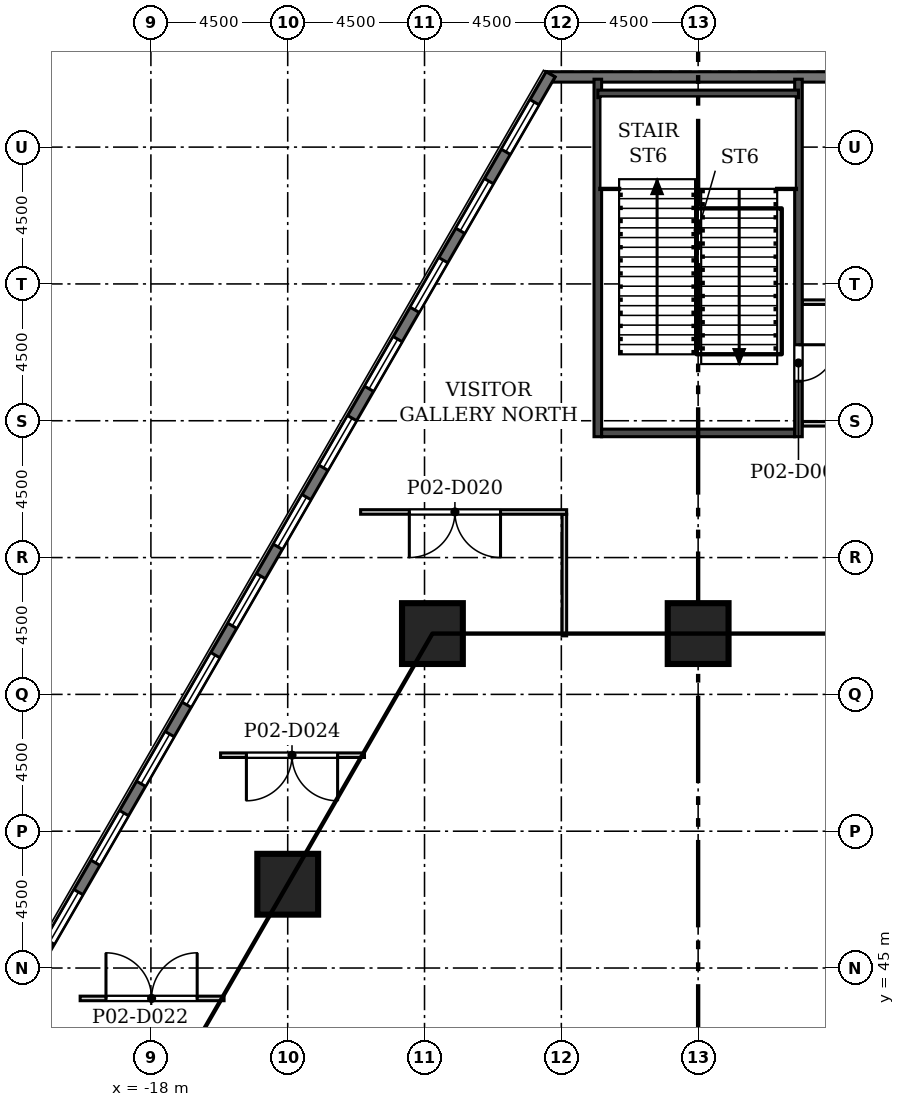
"""IFC4 building model, lengths in metres.
Left out: names, types, materials, properties, quantities, classifications, styles, units other than length and angle.
Written with IfcOpenShell. Run it as: python <this file> out.ifc"""

import sys

from ifc_helpers import new_model, si_unit, direction, frame, frame_2d, origin, origin_2d, place, context, subcontext, project, spatial, polyline, rectangle, outline, extrude, element, fill, save


model = new_model("IFC4")
c1 = context("Model", 3, precision=1e-05, world=origin(), true_north=direction((0.0, 1.0)))
c2 = subcontext(c1, "Body", "Model", "MODEL_VIEW")
j1 = project(units=[si_unit("LENGTHUNIT", "METRE"), si_unit("PLANEANGLEUNIT", "RADIAN")], contexts=[c1])
p1 = place(None, origin())
s1 = spatial("IfcSite", under=j1, at=p1, CompositionType="ELEMENT")
p2 = place(p1, origin())
s2 = spatial("IfcBuilding", under=s1, at=p2, CompositionType="ELEMENT")
p3 = place(p2, frame((0.0, 0.0, 14.0)))
s3 = spatial("IfcBuildingStorey", under=s2, at=p3, CompositionType="ELEMENT", Elevation=14.0)
for number, where, z_axis, x_axis in (
    (1, (-8.74, 56.0, 0.0), (0.0, 0.0, 1.0), (1.0, 0.0, 0.0)),
    (2, (-13.5, 47.756, 0.0), (0.0, 0.0, 1.0), (1.0, 0.0, 0.0)),
    (3, (0.0, 56.0, 0.0), (0.0, 0.0, 1.0), (1.0, 0.0, 0.0)),
):
    element("IfcColumn", number, at=place(p3, frame(where, z_axis=z_axis, x_axis=x_axis)), inside=s3, PredefinedType="COLUMN", context=c2, shape_type="SweptSolid", body=[
        extrude(rectangle(XDim=2.0, YDim=2.0, at=origin_2d()), origin(), (0.0, 0.0, 1.0), 6.0),
    ])
p4 = place(p3, origin())
e4 = element("IfcWall", 4, at=p4, inside=s3, PredefinedType="SOLIDWALL", context=c2, shape_type="SweptSolid", body=[
    extrude(outline(polyline([(5.001, 74.478), (4.706, 74.308), (4.805, 74.138), (-4.805, 74.138), (-4.706, 74.308), (-5.001, 74.478), (-5.001, 74.479), (5.001, 74.479), (5.001, 74.478)])), origin(), (0.0, 0.0, 1.0), 5.7),
])
p5 = place(p3, frame((-4.853, 74.393, 0.0), z_axis=(0.0, 0.0, 1.0), x_axis=(-0.49999894854, -0.866026010844, 0.0)))
e5 = element("IfcWall", 5, at=p5, inside=s3, PredefinedType="SOLIDWALL", context=c2, shape_type="SweptSolid", body=[
    extrude(rectangle(XDim=76.0, YDim=0.34, at=frame_2d((38.0, 0.0))), origin(), (0.0, 0.0, 1.0), 5.7),
])
p6 = place(p5, frame((1.058, 0.0, 0.9)))
e6 = element("IfcOpeningElement", 6, at=p6, cuts=e5, PredefinedType="OPENING", context=c2, shape_type="SweptSolid", body=[
    extrude(rectangle(XDim=1.885, YDim=3.5, at=frame_2d((0.942, 1.75))), frame((0.0, 0.18, 0.0), z_axis=(0.0, -1.0, 0.0), x_axis=(1.0, 0.0, 0.0)), (0.0, 0.0, 1.0), 0.36),
])
p7 = place(p5, frame((4.058, 0.0, 0.9)))
e7 = element("IfcOpeningElement", 7, at=p7, cuts=e5, PredefinedType="OPENING", context=c2, shape_type="SweptSolid", body=[
    extrude(rectangle(XDim=1.885, YDim=3.5, at=frame_2d((0.942, 1.75))), frame((0.0, 0.18, 0.0), z_axis=(0.0, -1.0, 0.0), x_axis=(1.0, 0.0, 0.0)), (0.0, 0.0, 1.0), 0.36),
])
p8 = place(p5, frame((7.058, 0.0, 0.9)))
e8 = element("IfcOpeningElement", 8, at=p8, cuts=e5, PredefinedType="OPENING", context=c2, shape_type="SweptSolid", body=[
    extrude(rectangle(XDim=1.885, YDim=3.5, at=frame_2d((0.942, 1.75))), frame((0.0, 0.18, 0.0), z_axis=(0.0, -1.0, 0.0), x_axis=(1.0, 0.0, 0.0)), (0.0, 0.0, 1.0), 0.36),
])
p9 = place(p5, frame((10.058, 0.0, 0.9)))
e9 = element("IfcOpeningElement", 9, at=p9, cuts=e5, PredefinedType="OPENING", context=c2, shape_type="SweptSolid", body=[
    extrude(rectangle(XDim=1.885, YDim=3.5, at=frame_2d((0.942, 1.75))), frame((0.0, 0.18, 0.0), z_axis=(0.0, -1.0, 0.0), x_axis=(1.0, 0.0, 0.0)), (0.0, 0.0, 1.0), 0.36),
])
p10 = place(p5, frame((13.058, 0.0, 0.9)))
e10 = element("IfcOpeningElement", 10, at=p10, cuts=e5, PredefinedType="OPENING", context=c2, shape_type="SweptSolid", body=[
    extrude(rectangle(XDim=1.885, YDim=3.5, at=frame_2d((0.942, 1.75))), frame((0.0, 0.18, 0.0), z_axis=(0.0, -1.0, 0.0), x_axis=(1.0, 0.0, 0.0)), (0.0, 0.0, 1.0), 0.36),
])
p11 = place(p5, frame((16.058, 0.0, 0.9)))
e11 = element("IfcOpeningElement", 11, at=p11, cuts=e5, PredefinedType="OPENING", context=c2, shape_type="SweptSolid", body=[
    extrude(rectangle(XDim=1.885, YDim=3.5, at=frame_2d((0.942, 1.75))), frame((0.0, 0.18, 0.0), z_axis=(0.0, -1.0, 0.0), x_axis=(1.0, 0.0, 0.0)), (0.0, 0.0, 1.0), 0.36),
])
p12 = place(p5, frame((19.058, 0.0, 0.9)))
e12 = element("IfcOpeningElement", 12, at=p12, cuts=e5, PredefinedType="OPENING", context=c2, shape_type="SweptSolid", body=[
    extrude(rectangle(XDim=1.885, YDim=3.5, at=frame_2d((0.942, 1.75))), frame((0.0, 0.18, 0.0), z_axis=(0.0, -1.0, 0.0), x_axis=(1.0, 0.0, 0.0)), (0.0, 0.0, 1.0), 0.36),
])
p13 = place(p5, frame((22.058, 0.0, 0.9)))
e13 = element("IfcOpeningElement", 13, at=p13, cuts=e5, PredefinedType="OPENING", context=c2, shape_type="SweptSolid", body=[
    extrude(rectangle(XDim=1.885, YDim=3.5, at=frame_2d((0.942, 1.75))), frame((0.0, 0.18, 0.0), z_axis=(0.0, -1.0, 0.0), x_axis=(1.0, 0.0, 0.0)), (0.0, 0.0, 1.0), 0.36),
])
p14 = place(p5, frame((25.058, 0.0, 0.9)))
e14 = element("IfcOpeningElement", 14, at=p14, cuts=e5, PredefinedType="OPENING", context=c2, shape_type="SweptSolid", body=[
    extrude(rectangle(XDim=1.885, YDim=3.5, at=frame_2d((0.942, 1.75))), frame((0.0, 0.18, 0.0), z_axis=(0.0, -1.0, 0.0), x_axis=(1.0, 0.0, 0.0)), (0.0, 0.0, 1.0), 0.36),
])
p15 = place(p5, frame((28.058, 0.0, 0.9)))
e15 = element("IfcOpeningElement", 15, at=p15, cuts=e5, PredefinedType="OPENING", context=c2, shape_type="SweptSolid", body=[
    extrude(rectangle(XDim=1.885, YDim=3.5, at=frame_2d((0.942, 1.75))), frame((0.0, 0.18, 0.0), z_axis=(0.0, -1.0, 0.0), x_axis=(1.0, 0.0, 0.0)), (0.0, 0.0, 1.0), 0.36),
])
p16 = place(p5, frame((31.058, 0.0, 0.9)))
e16 = element("IfcOpeningElement", 16, at=p16, cuts=e5, PredefinedType="OPENING", context=c2, shape_type="SweptSolid", body=[
    extrude(rectangle(XDim=1.885, YDim=3.5, at=frame_2d((0.942, 1.75))), frame((0.0, 0.18, 0.0), z_axis=(0.0, -1.0, 0.0), x_axis=(1.0, 0.0, 0.0)), (0.0, 0.0, 1.0), 0.36),
])
p17 = place(p5, frame((34.058, 0.0, 0.9)))
e17 = element("IfcOpeningElement", 17, at=p17, cuts=e5, PredefinedType="OPENING", context=c2, shape_type="SweptSolid", body=[
    extrude(rectangle(XDim=1.885, YDim=3.5, at=frame_2d((0.942, 1.75))), frame((0.0, 0.18, 0.0), z_axis=(0.0, -1.0, 0.0), x_axis=(1.0, 0.0, 0.0)), (0.0, 0.0, 1.0), 0.36),
])
p18 = place(p5, frame((37.058, 0.0, 0.9)))
e18 = element("IfcOpeningElement", 18, at=p18, cuts=e5, PredefinedType="OPENING", context=c2, shape_type="SweptSolid", body=[
    extrude(rectangle(XDim=1.885, YDim=3.5, at=frame_2d((0.942, 1.75))), frame((0.0, 0.18, 0.0), z_axis=(0.0, -1.0, 0.0), x_axis=(1.0, 0.0, 0.0)), (0.0, 0.0, 1.0), 0.36),
])
p19 = place(p5, frame((40.058, 0.0, 0.9)))
e19 = element("IfcOpeningElement", 19, at=p19, cuts=e5, PredefinedType="OPENING", context=c2, shape_type="SweptSolid", body=[
    extrude(rectangle(XDim=1.885, YDim=3.5, at=frame_2d((0.942, 1.75))), frame((0.0, 0.18, 0.0), z_axis=(0.0, -1.0, 0.0), x_axis=(1.0, 0.0, 0.0)), (0.0, 0.0, 1.0), 0.36),
])
p20 = place(p5, frame((43.058, 0.0, 0.9)))
e20 = element("IfcOpeningElement", 20, at=p20, cuts=e5, PredefinedType="OPENING", context=c2, shape_type="SweptSolid", body=[
    extrude(rectangle(XDim=1.885, YDim=3.5, at=frame_2d((0.942, 1.75))), frame((0.0, 0.18, 0.0), z_axis=(0.0, -1.0, 0.0), x_axis=(1.0, 0.0, 0.0)), (0.0, 0.0, 1.0), 0.36),
])
p21 = place(p5, frame((46.058, 0.0, 0.9)))
e21 = element("IfcOpeningElement", 21, at=p21, cuts=e5, PredefinedType="OPENING", context=c2, shape_type="SweptSolid", body=[
    extrude(rectangle(XDim=1.885, YDim=3.5, at=frame_2d((0.942, 1.75))), frame((0.0, 0.18, 0.0), z_axis=(0.0, -1.0, 0.0), x_axis=(1.0, 0.0, 0.0)), (0.0, 0.0, 1.0), 0.36),
])
p22 = place(p5, frame((49.058, 0.0, 0.9)))
e22 = element("IfcOpeningElement", 22, at=p22, cuts=e5, PredefinedType="OPENING", context=c2, shape_type="SweptSolid", body=[
    extrude(rectangle(XDim=1.885, YDim=3.5, at=frame_2d((0.942, 1.75))), frame((0.0, 0.18, 0.0), z_axis=(0.0, -1.0, 0.0), x_axis=(1.0, 0.0, 0.0)), (0.0, 0.0, 1.0), 0.36),
])
p23 = place(p5, frame((52.058, 0.0, 0.9)))
e23 = element("IfcOpeningElement", 23, at=p23, cuts=e5, PredefinedType="OPENING", context=c2, shape_type="SweptSolid", body=[
    extrude(rectangle(XDim=1.885, YDim=3.5, at=frame_2d((0.942, 1.75))), frame((0.0, 0.18, 0.0), z_axis=(0.0, -1.0, 0.0), x_axis=(1.0, 0.0, 0.0)), (0.0, 0.0, 1.0), 0.36),
])
p24 = place(p5, frame((55.058, 0.0, 0.9)))
e24 = element("IfcOpeningElement", 24, at=p24, cuts=e5, PredefinedType="OPENING", context=c2, shape_type="SweptSolid", body=[
    extrude(rectangle(XDim=1.885, YDim=3.5, at=frame_2d((0.942, 1.75))), frame((0.0, 0.18, 0.0), z_axis=(0.0, -1.0, 0.0), x_axis=(1.0, 0.0, 0.0)), (0.0, 0.0, 1.0), 0.36),
])
p25 = place(p5, frame((58.058, 0.0, 0.9)))
e25 = element("IfcOpeningElement", 25, at=p25, cuts=e5, PredefinedType="OPENING", context=c2, shape_type="SweptSolid", body=[
    extrude(rectangle(XDim=1.885, YDim=3.5, at=frame_2d((0.942, 1.75))), frame((0.0, 0.18, 0.0), z_axis=(0.0, -1.0, 0.0), x_axis=(1.0, 0.0, 0.0)), (0.0, 0.0, 1.0), 0.36),
])
p26 = place(p5, frame((61.058, 0.0, 0.9)))
e26 = element("IfcOpeningElement", 26, at=p26, cuts=e5, PredefinedType="OPENING", context=c2, shape_type="SweptSolid", body=[
    extrude(rectangle(XDim=1.885, YDim=3.5, at=frame_2d((0.942, 1.75))), frame((0.0, 0.18, 0.0), z_axis=(0.0, -1.0, 0.0), x_axis=(1.0, 0.0, 0.0)), (0.0, 0.0, 1.0), 0.36),
])
p27 = place(p5, frame((64.058, 0.0, 0.9)))
e27 = element("IfcOpeningElement", 27, at=p27, cuts=e5, PredefinedType="OPENING", context=c2, shape_type="SweptSolid", body=[
    extrude(rectangle(XDim=1.885, YDim=3.5, at=frame_2d((0.942, 1.75))), frame((0.0, 0.18, 0.0), z_axis=(0.0, -1.0, 0.0), x_axis=(1.0, 0.0, 0.0)), (0.0, 0.0, 1.0), 0.36),
])
p28 = place(p5, frame((67.058, 0.0, 0.9)))
e28 = element("IfcOpeningElement", 28, at=p28, cuts=e5, PredefinedType="OPENING", context=c2, shape_type="SweptSolid", body=[
    extrude(rectangle(XDim=1.885, YDim=3.5, at=frame_2d((0.942, 1.75))), frame((0.0, 0.18, 0.0), z_axis=(0.0, -1.0, 0.0), x_axis=(1.0, 0.0, 0.0)), (0.0, 0.0, 1.0), 0.36),
])
p29 = place(p5, frame((70.058, 0.0, 0.9)))
e29 = element("IfcOpeningElement", 29, at=p29, cuts=e5, PredefinedType="OPENING", context=c2, shape_type="SweptSolid", body=[
    extrude(rectangle(XDim=1.885, YDim=3.5, at=frame_2d((0.942, 1.75))), frame((0.0, 0.18, 0.0), z_axis=(0.0, -1.0, 0.0), x_axis=(1.0, 0.0, 0.0)), (0.0, 0.0, 1.0), 0.36),
])
p30 = place(p5, frame((73.058, 0.0, 0.9)))
e30 = element("IfcOpeningElement", 30, at=p30, cuts=e5, PredefinedType="OPENING", context=c2, shape_type="SweptSolid", body=[
    extrude(rectangle(XDim=1.885, YDim=3.5, at=frame_2d((0.942, 1.75))), frame((0.0, 0.18, 0.0), z_axis=(0.0, -1.0, 0.0), x_axis=(1.0, 0.0, 0.0)), (0.0, 0.0, 1.0), 0.36),
])
p31 = place(p3, frame((-20.327, 44.0, 0.0), z_axis=(0.0, 0.0, 1.0), x_axis=(1.0, 0.0, 0.0)))
e31 = element("IfcWall", 31, at=p31, inside=s3, PredefinedType="PARTITIONING", context=c2, shape_type="SweptSolid", body=[
    extrude(rectangle(XDim=4.734, YDim=0.15, at=frame_2d((2.367, 0.0))), origin(), (0.0, 0.0, 1.0), 5.7),
])
p32 = place(p31, frame((0.85, 0.0, 0.0)))
e32 = element("IfcOpeningElement", 32, at=p32, cuts=e31, PredefinedType="OPENING", context=c2, shape_type="SweptSolid", body=[
    extrude(rectangle(XDim=3.0, YDim=2.4, at=frame_2d((1.5, 1.2))), frame((0.0, 0.085, 0.0), z_axis=(0.0, -1.0, 0.0), x_axis=(1.0, 0.0, 0.0)), (0.0, 0.0, 1.0), 0.17),
])
p33 = place(p3, frame((-15.709, 52.0, 0.0), z_axis=(0.0, 0.0, 1.0), x_axis=(1.0, 0.0, 0.0)))
e33 = element("IfcWall", 33, at=p33, inside=s3, PredefinedType="PARTITIONING", context=c2, shape_type="SweptSolid", body=[
    extrude(rectangle(XDim=4.734, YDim=0.15, at=frame_2d((2.367, 0.0))), origin(), (0.0, 0.0, 1.0), 5.7),
])
p34 = place(p33, frame((0.85, 0.0, 0.0)))
e34 = element("IfcOpeningElement", 34, at=p34, cuts=e33, PredefinedType="OPENING", context=c2, shape_type="SweptSolid", body=[
    extrude(rectangle(XDim=3.0, YDim=2.4, at=frame_2d((1.5, 1.2))), frame((0.0, 0.085, 0.0), z_axis=(0.0, -1.0, 0.0), x_axis=(1.0, 0.0, 0.0)), (0.0, 0.0, 1.0), 0.17),
])
p35 = place(p3, frame((-4.4, 59.925, 0.0), z_axis=(0.0, 0.0, 1.0), x_axis=(0.0, -1.0, 0.0)))
e35 = element("IfcWall", 35, at=p35, inside=s3, PredefinedType="PARTITIONING", context=c2, shape_type="SweptSolid", body=[
    extrude(rectangle(XDim=4.0, YDim=0.15, at=frame_2d((2.0, 0.0))), origin(), (0.0, 0.0, 1.0), 5.7),
])
p36 = place(p3, frame((-11.102, 60.0, 0.0), z_axis=(0.0, 0.0, 1.0), x_axis=(1.0, 0.0, 0.0)))
e36 = element("IfcWall", 36, at=p36, inside=s3, PredefinedType="PARTITIONING", context=c2, shape_type="SweptSolid", body=[
    extrude(rectangle(XDim=6.777, YDim=0.15, at=frame_2d((3.389, 0.0))), origin(), (0.0, 0.0, 1.0), 5.7),
])
p37 = place(p36, frame((1.602, 0.0, 0.0)))
e37 = element("IfcOpeningElement", 37, at=p37, cuts=e36, PredefinedType="OPENING", context=c2, shape_type="SweptSolid", body=[
    extrude(rectangle(XDim=3.0, YDim=2.4, at=frame_2d((1.5, 1.2))), frame((0.0, 0.085, 0.0), z_axis=(0.0, -1.0, 0.0), x_axis=(1.0, 0.0, 0.0)), (0.0, 0.0, 1.0), 0.17),
])
p38 = place(p3, frame((-3.3, 62.475, 0.0), z_axis=(0.0, 0.0, 1.0), x_axis=(0.0, 1.0, 0.0)))
e38 = element("IfcWall", 38, at=p38, inside=s3, PredefinedType="SOLIDWALL", context=c2, shape_type="SweptSolid", body=[
    extrude(rectangle(XDim=11.758, YDim=0.25, at=frame_2d((5.879, 0.0))), origin(), (0.0, 0.0, 1.0), 5.7),
])
p39 = place(p3, frame((3.175, 62.6, 0.0), z_axis=(0.0, 0.0, 1.0), x_axis=(-1.0, 0.0, 0.0)))
e39 = element("IfcWall", 39, at=p39, inside=s3, PredefinedType="SOLIDWALL", context=c2, shape_type="SweptSolid", body=[
    extrude(rectangle(XDim=6.35, YDim=0.25, at=frame_2d((3.175, 0.0))), origin(), (0.0, 0.0, 1.0), 5.7),
])
for number, where, z_axis, x_axis in (
    (40, (5.025, 62.9, 0.0), (0.0, 0.0, 1.0), (-1.0, 0.0, 0.0)),
    (41, (3.425, 66.9, 0.0), (0.0, 0.0, 1.0), (1.0, 0.0, 0.0)),
):
    element("IfcWall", number, at=place(p3, frame(where, z_axis=z_axis, x_axis=x_axis)), inside=s3, PredefinedType="PARTITIONING", context=c2, shape_type="SweptSolid", body=[
        extrude(rectangle(XDim=1.6, YDim=0.15, at=frame_2d((0.8, 0.0))), origin(), (0.0, 0.0, 1.0), 5.7),
    ])
p40 = place(p3, frame((3.3, 74.233, 0.0), z_axis=(0.0, 0.0, 1.0), x_axis=(0.0, -1.0, 0.0)))
e42 = element("IfcWall", 42, at=p40, inside=s3, PredefinedType="SOLIDWALL", context=c2, shape_type="SweptSolid", body=[
    extrude(rectangle(XDim=11.758, YDim=0.25, at=frame_2d((5.879, 0.0))), origin(), (0.0, 0.0, 1.0), 5.7),
])
p41 = place(p40, frame((8.733, 0.0, 0.0)))
e43 = element("IfcOpeningElement", 43, at=p41, cuts=e42, PredefinedType="OPENING", context=c2, shape_type="SweptSolid", body=[
    extrude(rectangle(XDim=1.2, YDim=2.1, at=frame_2d((0.6, 1.05))), frame((0.0, 0.135, 0.0), z_axis=(0.0, -1.0, 0.0), x_axis=(1.0, 0.0, 0.0)), (0.0, 0.0, 1.0), 0.27),
])
p42 = place(p3, frame((-3.3, 73.75, 0.0), z_axis=(0.0, 0.0, 1.0), x_axis=(1.0, 0.0, 0.0)))
e44 = element("IfcWall", 44, at=p42, inside=s3, PredefinedType="SOLIDWALL", context=c2, shape_type="SweptSolid", body=[
    extrude(rectangle(XDim=6.6, YDim=0.25, at=frame_2d((3.3, 0.0))), origin(), (0.0, 0.0, 1.0), 5.7),
])
p43 = place(p6, origin())
e45 = element("IfcWindow", 45, at=p43, inside=s3, PartitioningType="SINGLE_PANEL", PredefinedType="WINDOW", context=c2, shape_type="SweptSolid", body=[
    extrude(rectangle(XDim=1.885, YDim=3.5, at=frame_2d((0.942, 1.75))), frame((0.0, 0.11, 0.0), z_axis=(0.0, -1.0, 0.0), x_axis=(1.0, 0.0, 0.0)), (0.0, 0.0, 1.0), 0.06),
])
fill(e6, e45)
p44 = place(p7, origin())
e46 = element("IfcWindow", 46, at=p44, inside=s3, PartitioningType="SINGLE_PANEL", PredefinedType="WINDOW", context=c2, shape_type="SweptSolid", body=[
    extrude(rectangle(XDim=1.885, YDim=3.5, at=frame_2d((0.942, 1.75))), frame((0.0, 0.11, 0.0), z_axis=(0.0, -1.0, 0.0), x_axis=(1.0, 0.0, 0.0)), (0.0, 0.0, 1.0), 0.06),
])
fill(e7, e46)
p45 = place(p8, origin())
e47 = element("IfcWindow", 47, at=p45, inside=s3, PartitioningType="SINGLE_PANEL", PredefinedType="WINDOW", context=c2, shape_type="SweptSolid", body=[
    extrude(rectangle(XDim=1.885, YDim=3.5, at=frame_2d((0.942, 1.75))), frame((0.0, 0.11, 0.0), z_axis=(0.0, -1.0, 0.0), x_axis=(1.0, 0.0, 0.0)), (0.0, 0.0, 1.0), 0.06),
])
fill(e8, e47)
p46 = place(p9, origin())
e48 = element("IfcWindow", 48, at=p46, inside=s3, PartitioningType="SINGLE_PANEL", PredefinedType="WINDOW", context=c2, shape_type="SweptSolid", body=[
    extrude(rectangle(XDim=1.885, YDim=3.5, at=frame_2d((0.942, 1.75))), frame((0.0, 0.11, 0.0), z_axis=(0.0, -1.0, 0.0), x_axis=(1.0, 0.0, 0.0)), (0.0, 0.0, 1.0), 0.06),
])
fill(e9, e48)
p47 = place(p10, origin())
e49 = element("IfcWindow", 49, at=p47, inside=s3, PartitioningType="SINGLE_PANEL", PredefinedType="WINDOW", context=c2, shape_type="SweptSolid", body=[
    extrude(rectangle(XDim=1.885, YDim=3.5, at=frame_2d((0.942, 1.75))), frame((0.0, 0.11, 0.0), z_axis=(0.0, -1.0, 0.0), x_axis=(1.0, 0.0, 0.0)), (0.0, 0.0, 1.0), 0.06),
])
fill(e10, e49)
p48 = place(p11, origin())
e50 = element("IfcWindow", 50, at=p48, inside=s3, PartitioningType="SINGLE_PANEL", PredefinedType="WINDOW", context=c2, shape_type="SweptSolid", body=[
    extrude(rectangle(XDim=1.885, YDim=3.5, at=frame_2d((0.942, 1.75))), frame((0.0, 0.11, 0.0), z_axis=(0.0, -1.0, 0.0), x_axis=(1.0, 0.0, 0.0)), (0.0, 0.0, 1.0), 0.06),
])
fill(e11, e50)
p49 = place(p12, origin())
e51 = element("IfcWindow", 51, at=p49, inside=s3, PartitioningType="SINGLE_PANEL", PredefinedType="WINDOW", context=c2, shape_type="SweptSolid", body=[
    extrude(rectangle(XDim=1.885, YDim=3.5, at=frame_2d((0.942, 1.75))), frame((0.0, 0.11, 0.0), z_axis=(0.0, -1.0, 0.0), x_axis=(1.0, 0.0, 0.0)), (0.0, 0.0, 1.0), 0.06),
])
fill(e12, e51)
p50 = place(p13, origin())
e52 = element("IfcWindow", 52, at=p50, inside=s3, PartitioningType="SINGLE_PANEL", PredefinedType="WINDOW", context=c2, shape_type="SweptSolid", body=[
    extrude(rectangle(XDim=1.885, YDim=3.5, at=frame_2d((0.942, 1.75))), frame((0.0, 0.11, 0.0), z_axis=(0.0, -1.0, 0.0), x_axis=(1.0, 0.0, 0.0)), (0.0, 0.0, 1.0), 0.06),
])
fill(e13, e52)
p51 = place(p14, origin())
e53 = element("IfcWindow", 53, at=p51, inside=s3, PartitioningType="SINGLE_PANEL", PredefinedType="WINDOW", context=c2, shape_type="SweptSolid", body=[
    extrude(rectangle(XDim=1.885, YDim=3.5, at=frame_2d((0.942, 1.75))), frame((0.0, 0.11, 0.0), z_axis=(0.0, -1.0, 0.0), x_axis=(1.0, 0.0, 0.0)), (0.0, 0.0, 1.0), 0.06),
])
fill(e14, e53)
p52 = place(p15, origin())
e54 = element("IfcWindow", 54, at=p52, inside=s3, PartitioningType="SINGLE_PANEL", PredefinedType="WINDOW", context=c2, shape_type="SweptSolid", body=[
    extrude(rectangle(XDim=1.885, YDim=3.5, at=frame_2d((0.942, 1.75))), frame((0.0, 0.11, 0.0), z_axis=(0.0, -1.0, 0.0), x_axis=(1.0, 0.0, 0.0)), (0.0, 0.0, 1.0), 0.06),
])
fill(e15, e54)
p53 = place(p16, origin())
e55 = element("IfcWindow", 55, at=p53, inside=s3, PartitioningType="SINGLE_PANEL", PredefinedType="WINDOW", context=c2, shape_type="SweptSolid", body=[
    extrude(rectangle(XDim=1.885, YDim=3.5, at=frame_2d((0.942, 1.75))), frame((0.0, 0.11, 0.0), z_axis=(0.0, -1.0, 0.0), x_axis=(1.0, 0.0, 0.0)), (0.0, 0.0, 1.0), 0.06),
])
fill(e16, e55)
p54 = place(p41, origin())
e56 = element("IfcDoor", 56, at=p54, inside=s3, OperationType="SINGLE_SWING_LEFT", PredefinedType="DOOR", context=c2, shape_type="SweptSolid", body=[
    extrude(rectangle(XDim=1.2, YDim=2.1, at=frame_2d((0.6, 1.05))), frame((0.0, 0.025, 0.0), z_axis=(0.0, -1.0, 0.0), x_axis=(1.0, 0.0, 0.0)), (0.0, 0.0, 1.0), 0.05),
])
fill(e43, e56)
p55 = place(p37, frame((3.0, 0.0, 0.0), z_axis=(0.0, 0.0, 1.0), x_axis=(-1.0, 0.0, 0.0)))
e57 = element("IfcDoor", 57, at=p55, inside=s3, OperationType="DOUBLE_DOOR_SINGLE_SWING", PredefinedType="DOOR", context=c2, shape_type="SweptSolid", body=[
    extrude(rectangle(XDim=3.0, YDim=2.4, at=frame_2d((1.5, 1.2))), frame((0.0, 0.025, 0.0), z_axis=(0.0, -1.0, 0.0), x_axis=(1.0, 0.0, 0.0)), (0.0, 0.0, 1.0), 0.05),
])
fill(e37, e57)
p56 = place(p32, origin())
e58 = element("IfcDoor", 58, at=p56, inside=s3, OperationType="DOUBLE_DOOR_SINGLE_SWING", PredefinedType="DOOR", context=c2, shape_type="SweptSolid", body=[
    extrude(rectangle(XDim=3.0, YDim=2.4, at=frame_2d((1.5, 1.2))), frame((0.0, 0.025, 0.0), z_axis=(0.0, -1.0, 0.0), x_axis=(1.0, 0.0, 0.0)), (0.0, 0.0, 1.0), 0.05),
])
fill(e32, e58)
p57 = place(p34, frame((3.0, 0.0, 0.0), z_axis=(0.0, 0.0, 1.0), x_axis=(-1.0, 0.0, 0.0)))
e59 = element("IfcDoor", 59, at=p57, inside=s3, OperationType="DOUBLE_DOOR_SINGLE_SWING", PredefinedType="DOOR", context=c2, shape_type="SweptSolid", body=[
    extrude(rectangle(XDim=3.0, YDim=2.4, at=frame_2d((1.5, 1.2))), frame((0.0, 0.025, 0.0), z_axis=(0.0, -1.0, 0.0), x_axis=(1.0, 0.0, 0.0)), (0.0, 0.0, 1.0), 0.05),
])
fill(e34, e59)
save(model, sys.argv[1])
